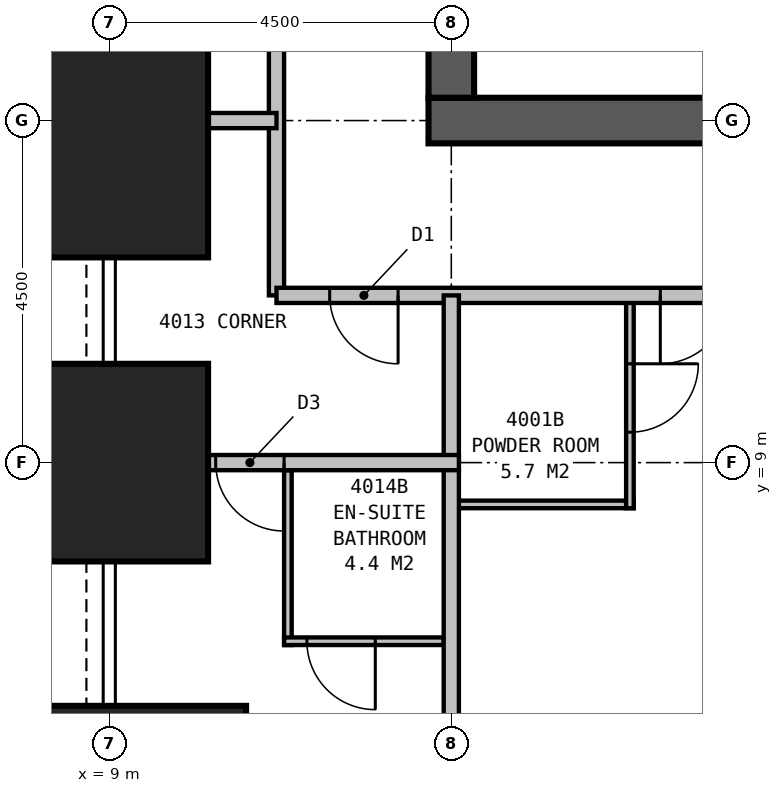
"""IFC4 building model, lengths in metres.
Left out: names, types, materials, properties, quantities, classifications, styles, units other than length and angle.
Written with IfcOpenShell. Run it as: python <this file> out.ifc"""

import sys

from ifc_helpers import new_model, si_unit, direction, frame, frame_2d, origin, origin_2d, place, context, subcontext, project, spatial, rectangle, extrude, element, fill, save


model = new_model("IFC4")
c1 = context("Model", 3, precision=1e-05, world=origin(), true_north=direction((0.0, 1.0)))
c2 = subcontext(c1, "Body", "Model", "MODEL_VIEW")
j1 = project(units=[si_unit("LENGTHUNIT", "METRE"), si_unit("PLANEANGLEUNIT", "RADIAN")], contexts=[c1])
p1 = place(None, origin())
s1 = spatial("IfcSite", under=j1, at=p1, CompositionType="ELEMENT")
p2 = place(p1, origin())
s2 = spatial("IfcBuilding", under=s1, at=p2, CompositionType="ELEMENT")
p3 = place(p2, frame((0.0, 0.0, 157.9)))
s3 = spatial("IfcBuildingStorey", under=s2, at=p3, CompositionType="ELEMENT", Elevation=157.9)
p4 = place(p3, frame((9.0, 13.5, 0.0), z_axis=(0.0, 0.0, 1.0), x_axis=(1.0, 0.0, 0.0)))
e1 = element("IfcColumn", 1, at=p4, inside=s3, PredefinedType="COLUMN", context=c2, shape_type="SweptSolid", body=[
    extrude(rectangle(XDim=2.6, YDim=3.6, at=origin_2d()), origin(), (0.0, 0.0, 1.0), 4.5),
])
p5 = place(p3, frame((9.0, 9.0, 0.0), z_axis=(0.0, 0.0, 1.0), x_axis=(1.0, 0.0, 0.0)))
e2 = element("IfcColumn", 2, at=p5, inside=s3, PredefinedType="COLUMN", context=c2, shape_type="SweptSolid", body=[
    extrude(rectangle(XDim=2.6, YDim=2.6, at=origin_2d()), origin(), (0.0, 0.0, 1.0), 4.5),
])
p6 = place(p3, frame((9.0, 4.5, 0.0), z_axis=(0.0, 0.0, 1.0), x_axis=(1.0, 0.0, 0.0)))
e3 = element("IfcColumn", 3, at=p6, inside=s3, PredefinedType="COLUMN", context=c2, shape_type="SweptSolid", body=[
    extrude(rectangle(XDim=3.6, YDim=2.6, at=origin_2d()), origin(), (0.0, 0.0, 1.0), 4.5),
])
p7 = place(p3, frame((13.2, 13.5, 0.0), z_axis=(0.0, 0.0, 1.0), x_axis=(1.0, 0.0, 0.0)))
e4 = element("IfcWall", 4, at=p7, inside=s3, PredefinedType="SHEAR", context=c2, shape_type="SweptSolid", body=[
    extrude(rectangle(XDim=23.1, YDim=0.6, at=frame_2d((11.55, 0.0))), origin(), (0.0, 0.0, 1.0), 4.5),
])
p8 = place(p3, frame((13.5, 16.5, 0.0), z_axis=(0.0, 0.0, 1.0), x_axis=(0.0, -1.0, 0.0)))
e5 = element("IfcWall", 5, at=p8, inside=s3, PredefinedType="SHEAR", context=c2, shape_type="SweptSolid", body=[
    extrude(rectangle(XDim=2.7, YDim=0.6, at=frame_2d((1.35, 0.0))), origin(), (0.0, 0.0, 1.0), 4.5),
])
p9 = place(p3, frame((11.2, 11.2, 0.0), z_axis=(0.0, 0.0, 1.0), x_axis=(1.0, 0.0, 0.0)))
e6 = element("IfcWall", 6, at=p9, inside=s3, PredefinedType="PARTITIONING", context=c2, shape_type="SweptSolid", body=[
    extrude(rectangle(XDim=27.1, YDim=0.2, at=frame_2d((13.55, 0.0))), origin(), (0.0, 0.0, 1.0), 4.25),
])
p10 = place(p9, frame((5.95, 0.0, 0.0), z_axis=(0.0, 0.0, 1.0), x_axis=(-1.0, 0.0, 0.0)))
e7 = element("IfcOpeningElement", 7, at=p10, cuts=e6, PredefinedType="OPENING", context=c2, shape_type="SweptSolid", body=[
    extrude(rectangle(XDim=0.9, YDim=2.1, at=frame_2d((0.45, 1.05))), frame((0.0, 0.11, 0.0), z_axis=(0.0, -1.0, 0.0), x_axis=(1.0, 0.0, 0.0)), (0.0, 0.0, 1.0), 0.22),
])
p11 = place(p9, frame((19.95, 0.0, 0.0), z_axis=(0.0, 0.0, 1.0), x_axis=(-1.0, 0.0, 0.0)))
e8 = element("IfcOpeningElement", 8, at=p11, cuts=e6, PredefinedType="OPENING", context=c2, shape_type="SweptSolid", body=[
    extrude(rectangle(XDim=1.0, YDim=2.1, at=frame_2d((0.5, 1.05))), frame((0.0, 0.11, 0.0), z_axis=(0.0, -1.0, 0.0), x_axis=(1.0, 0.0, 0.0)), (0.0, 0.0, 1.0), 0.22),
])
p12 = place(p9, frame((24.35, 0.0, 0.0), z_axis=(0.0, 0.0, 1.0), x_axis=(-1.0, 0.0, 0.0)))
e9 = element("IfcOpeningElement", 9, at=p12, cuts=e6, PredefinedType="OPENING", context=c2, shape_type="SweptSolid", body=[
    extrude(rectangle(XDim=0.9, YDim=2.1, at=frame_2d((0.45, 1.05))), frame((0.0, 0.11, 0.0), z_axis=(0.0, -1.0, 0.0), x_axis=(1.0, 0.0, 0.0)), (0.0, 0.0, 1.0), 0.22),
])
p13 = place(p9, frame((1.6, 0.0, 0.0), z_axis=(0.0, 0.0, 1.0), x_axis=(-1.0, 0.0, 0.0)))
e10 = element("IfcOpeningElement", 10, at=p13, cuts=e6, PredefinedType="OPENING", context=c2, shape_type="SweptSolid", body=[
    extrude(rectangle(XDim=0.9, YDim=2.1, at=frame_2d((0.45, 1.05))), frame((0.0, 0.11, 0.0), z_axis=(0.0, -1.0, 0.0), x_axis=(1.0, 0.0, 0.0)), (0.0, 0.0, 1.0), 0.22),
])
p14 = place(p9, frame((26.4, 0.0, 0.0), z_axis=(0.0, 0.0, 1.0), x_axis=(-1.0, 0.0, 0.0)))
e11 = element("IfcOpeningElement", 11, at=p14, cuts=e6, PredefinedType="OPENING", context=c2, shape_type="SweptSolid", body=[
    extrude(rectangle(XDim=0.9, YDim=2.1, at=frame_2d((0.45, 1.05))), frame((0.0, 0.11, 0.0), z_axis=(0.0, -1.0, 0.0), x_axis=(1.0, 0.0, 0.0)), (0.0, 0.0, 1.0), 0.22),
])
p15 = place(p3, frame((11.2, 11.2, 0.0), z_axis=(0.0, 0.0, 1.0), x_axis=(0.0, 1.0, 0.0)))
e12 = element("IfcWall", 12, at=p15, inside=s3, PredefinedType="PARTITIONING", context=c2, shape_type="SweptSolid", body=[
    extrude(rectangle(XDim=18.7, YDim=0.2, at=frame_2d((9.35, 0.0))), origin(), (0.0, 0.0, 1.0), 4.25),
])
p16 = place(p15, frame((5.8, 0.0, 0.0)))
e13 = element("IfcOpeningElement", 13, at=p16, cuts=e12, PredefinedType="OPENING", context=c2, shape_type="SweptSolid", body=[
    extrude(rectangle(XDim=0.9, YDim=2.1, at=frame_2d((0.45, 1.05))), frame((0.0, 0.11, 0.0), z_axis=(0.0, -1.0, 0.0), x_axis=(1.0, 0.0, 0.0)), (0.0, 0.0, 1.0), 0.22),
])
p17 = place(p15, frame((9.55, 0.0, 0.0)))
e14 = element("IfcOpeningElement", 14, at=p17, cuts=e12, PredefinedType="OPENING", context=c2, shape_type="SweptSolid", body=[
    extrude(rectangle(XDim=0.9, YDim=2.1, at=frame_2d((0.45, 1.05))), frame((0.0, 0.11, 0.0), z_axis=(0.0, -1.0, 0.0), x_axis=(1.0, 0.0, 0.0)), (0.0, 0.0, 1.0), 0.22),
])
p18 = place(p3, frame((13.5, 8.45, 0.0), z_axis=(0.0, 0.0, 1.0), x_axis=(1.0, 0.0, 0.0)))
e15 = element("IfcWall", 15, at=p18, inside=s3, PredefinedType="PLUMBINGWALL", context=c2, shape_type="SweptSolid", body=[
    extrude(rectangle(XDim=2.4, YDim=0.1, at=frame_2d((1.2, 0.0))), origin(), (0.0, 0.0, 1.0), 4.25),
])
p19 = place(p3, frame((15.85, 11.2, 0.0), z_axis=(0.0, 0.0, 1.0), x_axis=(0.0, -1.0, 0.0)))
e16 = element("IfcWall", 16, at=p19, inside=s3, PredefinedType="PLUMBINGWALL", context=c2, shape_type="SweptSolid", body=[
    extrude(rectangle(XDim=2.8, YDim=0.1, at=frame_2d((1.4, 0.0))), origin(), (0.0, 0.0, 1.0), 4.25),
])
p20 = place(p19, frame((0.9, 0.0, 0.0)))
e17 = element("IfcOpeningElement", 17, at=p20, cuts=e16, PredefinedType="OPENING", context=c2, shape_type="SweptSolid", body=[
    extrude(rectangle(XDim=0.9, YDim=2.1, at=frame_2d((0.45, 1.05))), frame((0.0, 0.06, 0.0), z_axis=(0.0, -1.0, 0.0), x_axis=(1.0, 0.0, 0.0)), (0.0, 0.0, 1.0), 0.12),
])
p21 = place(p3, frame((11.2, 13.5, 0.0), z_axis=(0.0, 0.0, 1.0), x_axis=(-1.0, 0.0, 0.0)))
e18 = element("IfcWall", 18, at=p21, inside=s3, PredefinedType="PARTITIONING", context=c2, shape_type="SweptSolid", body=[
    extrude(rectangle(XDim=2.2, YDim=0.2, at=frame_2d((1.1, 0.0))), origin(), (0.0, 0.0, 1.0), 2.95),
])
p22 = place(p3, frame((13.5, 11.2, 0.0), z_axis=(0.0, 0.0, 1.0), x_axis=(0.0, -1.0, 0.0)))
e19 = element("IfcWall", 19, at=p22, inside=s3, PredefinedType="PARTITIONING", context=c2, shape_type="SweptSolid", body=[
    extrude(rectangle(XDim=11.2, YDim=0.2, at=frame_2d((5.6, 0.0))), origin(), (0.0, 0.0, 1.0), 3.25),
])
p23 = place(p3, frame((13.6, 9.0, 0.0), z_axis=(0.0, 0.0, 1.0), x_axis=(-1.0, 0.0, 0.0)))
e20 = element("IfcWall", 20, at=p23, inside=s3, PredefinedType="PARTITIONING", context=c2, shape_type="SweptSolid", body=[
    extrude(rectangle(XDim=4.6, YDim=0.2, at=frame_2d((2.3, 0.0))), origin(), (0.0, 0.0, 1.0), 4.25),
])
p24 = place(p23, frame((2.3, 0.0, 0.0)))
e21 = element("IfcOpeningElement", 21, at=p24, cuts=e20, PredefinedType="OPENING", context=c2, shape_type="SweptSolid", body=[
    extrude(rectangle(XDim=0.9, YDim=2.1, at=frame_2d((0.45, 1.05))), frame((0.0, 0.11, 0.0), z_axis=(0.0, -1.0, 0.0), x_axis=(1.0, 0.0, 0.0)), (0.0, 0.0, 1.0), 0.22),
])
p25 = place(p3, frame((11.35, 8.9, 0.0), z_axis=(0.0, 0.0, 1.0), x_axis=(0.0, -1.0, 0.0)))
e22 = element("IfcWall", 22, at=p25, inside=s3, PredefinedType="PLUMBINGWALL", context=c2, shape_type="SweptSolid", body=[
    extrude(rectangle(XDim=2.3, YDim=0.1, at=frame_2d((1.15, 0.0))), origin(), (0.0, 0.0, 1.0), 4.25),
])
p26 = place(p3, frame((13.4, 6.65, 0.0), z_axis=(0.0, 0.0, 1.0), x_axis=(-1.0, 0.0, 0.0)))
e23 = element("IfcWall", 23, at=p26, inside=s3, PredefinedType="PLUMBINGWALL", context=c2, shape_type="SweptSolid", body=[
    extrude(rectangle(XDim=2.1, YDim=0.1, at=frame_2d((1.05, 0.0))), origin(), (0.0, 0.0, 1.0), 4.25),
])
p27 = place(p26, frame((0.9, 0.0, 0.0)))
e24 = element("IfcOpeningElement", 24, at=p27, cuts=e23, PredefinedType="OPENING", context=c2, shape_type="SweptSolid", body=[
    extrude(rectangle(XDim=0.9, YDim=2.1, at=frame_2d((0.45, 1.05))), frame((0.0, 0.06, 0.0), z_axis=(0.0, -1.0, 0.0), x_axis=(1.0, 0.0, 0.0)), (0.0, 0.0, 1.0), 0.12),
])
p28 = place(p10, origin())
e25 = element("IfcDoor", 25, at=p28, inside=s3, OperationType="SINGLE_SWING_RIGHT", PredefinedType="DOOR", context=c2, shape_type="SweptSolid", body=[
    extrude(rectangle(XDim=0.9, YDim=2.1, at=frame_2d((0.45, 1.05))), frame((0.0, 0.025, 0.0), z_axis=(0.0, -1.0, 0.0), x_axis=(1.0, 0.0, 0.0)), (0.0, 0.0, 1.0), 0.05),
])
fill(e7, e25)
p29 = place(p13, origin())
e26 = element("IfcDoor", 26, at=p29, inside=s3, OperationType="SINGLE_SWING_LEFT", PredefinedType="DOOR", context=c2, shape_type="SweptSolid", body=[
    extrude(rectangle(XDim=0.9, YDim=2.1, at=frame_2d((0.45, 1.05))), frame((0.0, 0.025, 0.0), z_axis=(0.0, -1.0, 0.0), x_axis=(1.0, 0.0, 0.0)), (0.0, 0.0, 1.0), 0.05),
])
fill(e10, e26)
p30 = place(p20, origin())
e27 = element("IfcDoor", 27, at=p30, inside=s3, OperationType="SINGLE_SWING_LEFT", PredefinedType="DOOR", context=c2, shape_type="SweptSolid", body=[
    extrude(rectangle(XDim=0.9, YDim=2.1, at=frame_2d((0.45, 1.05))), frame((0.0, 0.025, 0.0), z_axis=(0.0, -1.0, 0.0), x_axis=(1.0, 0.0, 0.0)), (0.0, 0.0, 1.0), 0.05),
])
fill(e17, e27)
p31 = place(p24, origin())
e28 = element("IfcDoor", 28, at=p31, inside=s3, OperationType="SINGLE_SWING_LEFT", PredefinedType="DOOR", context=c2, shape_type="SweptSolid", body=[
    extrude(rectangle(XDim=0.9, YDim=2.1, at=frame_2d((0.45, 1.05))), frame((0.0, 0.025, 0.0), z_axis=(0.0, -1.0, 0.0), x_axis=(1.0, 0.0, 0.0)), (0.0, 0.0, 1.0), 0.05),
])
fill(e21, e28)
p32 = place(p27, origin())
e29 = element("IfcDoor", 29, at=p32, inside=s3, OperationType="SINGLE_SWING_LEFT", PredefinedType="DOOR", context=c2, shape_type="SweptSolid", body=[
    extrude(rectangle(XDim=0.9, YDim=2.1, at=frame_2d((0.45, 1.05))), frame((0.0, 0.025, 0.0), z_axis=(0.0, -1.0, 0.0), x_axis=(1.0, 0.0, 0.0)), (0.0, 0.0, 1.0), 0.05),
])
fill(e24, e29)
save(model, sys.argv[1])
